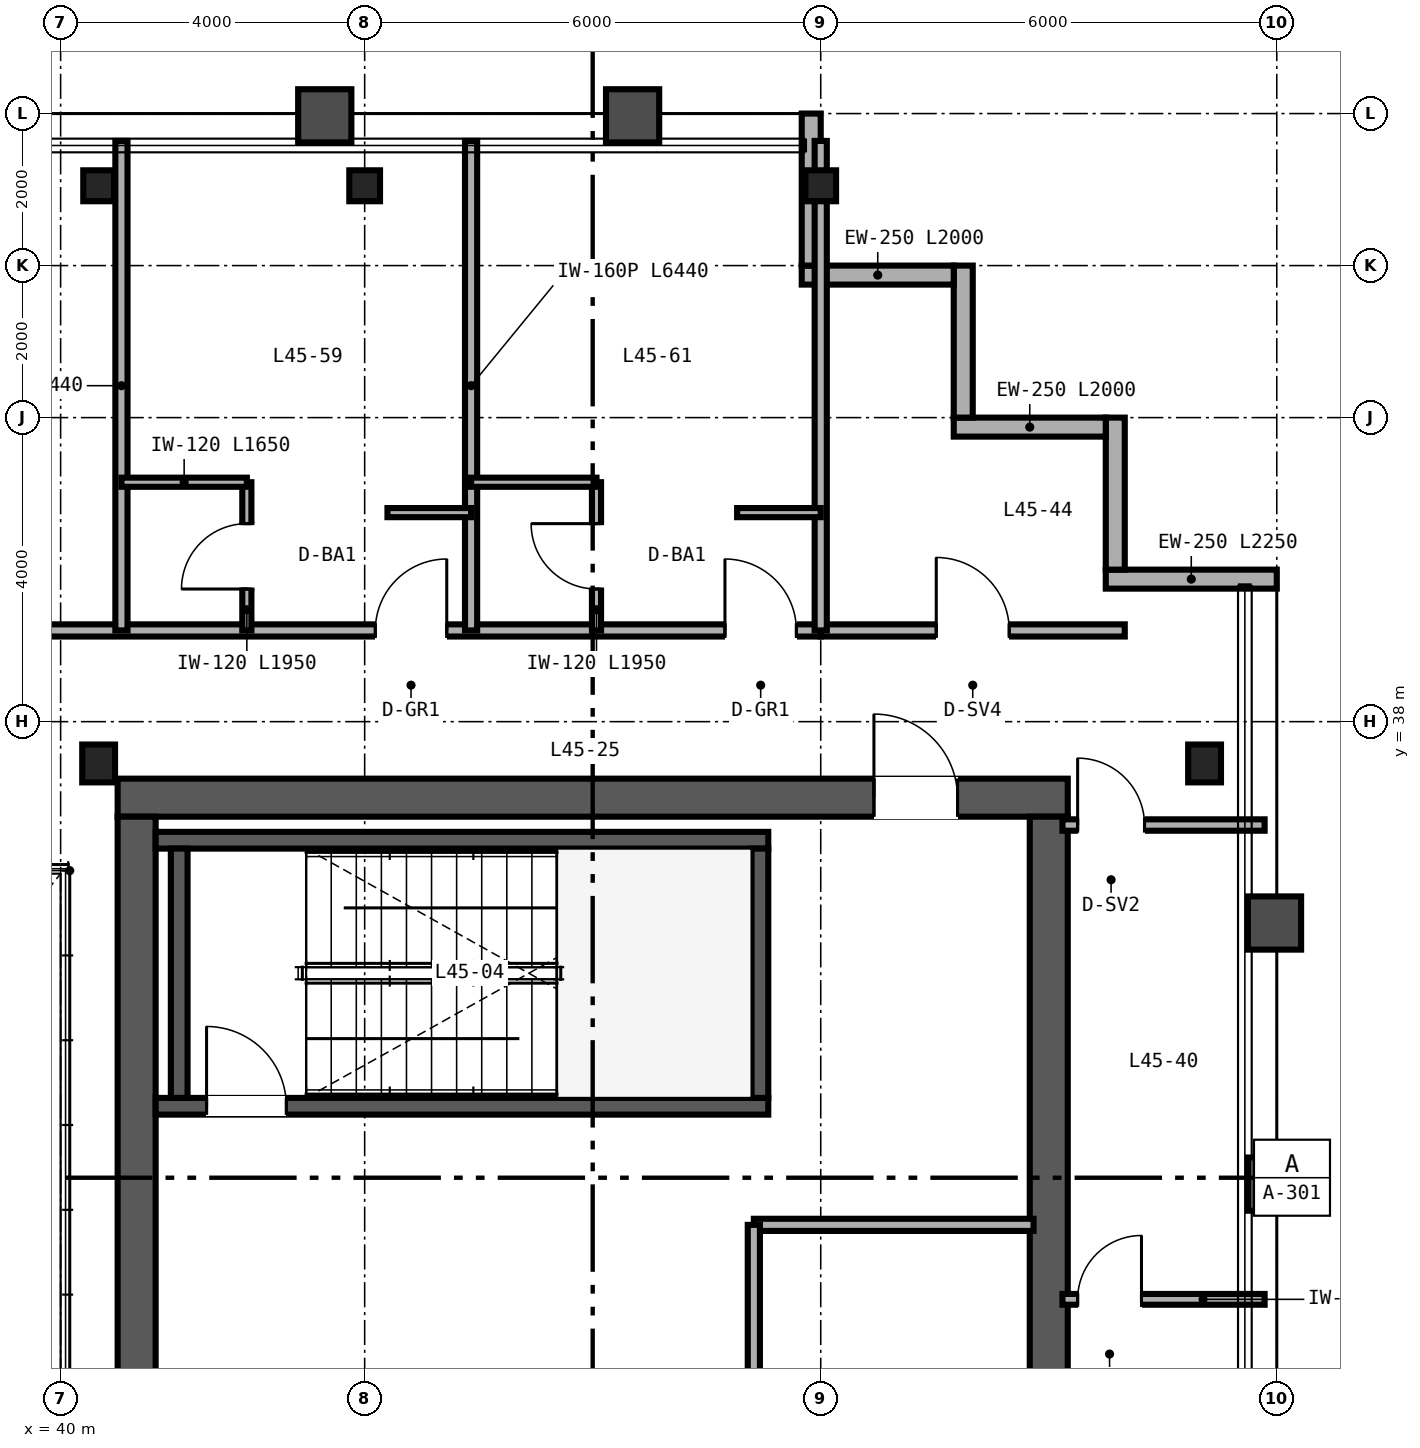
"""IFC4 building model, lengths in metres.
Left out: names, types, materials, properties, quantities, classifications, styles, units other than length and angle.
Written with IfcOpenShell. Run it as: python <this file> out.ifc"""

import sys

from ifc_helpers import new_model, si_unit, direction, frame, frame_2d, origin, origin_2d, place, context, subcontext, project, spatial, rectangle, i_section, extrude, source, transform, mapped, element, fill, save


model = new_model("IFC4")
c1 = context("Model", 3, precision=1e-05, world=origin(), true_north=direction((0.0, 1.0)))
c2 = subcontext(c1, "Body", "Model", "MODEL_VIEW")
j1 = project(units=[si_unit("LENGTHUNIT", "METRE"), si_unit("PLANEANGLEUNIT", "RADIAN")], contexts=[c1])
p1 = place(None, origin())
s1 = spatial("IfcSite", under=j1, at=p1, CompositionType="ELEMENT")
p2 = place(p1, origin())
s2 = spatial("IfcBuilding", under=s1, at=p2, CompositionType="ELEMENT")
p3 = place(p2, frame((0.0, 0.0, 181.2)))
s3 = spatial("IfcBuildingStorey", under=s2, at=p3, CompositionType="ELEMENT", Elevation=181.2)
p4 = place(p3, frame((40.75, 37.0, 0.0), z_axis=(0.0, 0.0, 1.0), x_axis=(1.0, 0.0, 0.0)))
e1 = element("IfcWall", 1, at=p4, inside=s3, PredefinedType="SHEAR", context=c2, shape_type="SweptSolid", body=[
    extrude(rectangle(XDim=12.5, YDim=0.5, at=frame_2d((6.25, 0.0))), origin(), (0.0, 0.0, 1.0), 3.37),
])
p5 = place(p4, frame((9.95, 0.0, 0.0)))
e2 = element("IfcOpeningElement", 2, at=p5, cuts=e1, PredefinedType="OPENING", context=c2, shape_type="SweptSolid", body=[
    extrude(rectangle(XDim=1.1, YDim=2.15, at=frame_2d((0.55, 1.075))), frame((0.0, 0.26, 0.0), z_axis=(0.0, -1.0, 0.0), x_axis=(1.0, 0.0, 0.0)), (0.0, 0.0, 1.0), 0.52),
])
for number, where, z_axis, x_axis in (
    (3, (41.0, 15.25, 0.0), (0.0, 0.0, 1.0), (0.0, 1.0, 0.0)),
    (4, (53.0, 15.25, 0.0), (0.0, 0.0, 1.0), (0.0, 1.0, 0.0)),
):
    element("IfcWall", number, at=place(p3, frame(where, z_axis=z_axis, x_axis=x_axis)), inside=s3, PredefinedType="SHEAR", context=c2, shape_type="SweptSolid", body=[
        extrude(rectangle(XDim=21.5, YDim=0.5, at=frame_2d((10.75, 0.0))), origin(), (0.0, 0.0, 1.0), 3.37),
    ])
p6 = place(p3, frame((41.25, 32.94, 0.0), z_axis=(0.0, 0.0, 1.0), x_axis=(1.0, 0.0, 0.0)))
e5 = element("IfcWall", 5, at=p6, inside=s3, PredefinedType="SHEAR", context=c2, shape_type="SweptSolid", body=[
    extrude(rectangle(XDim=8.06, YDim=0.22, at=frame_2d((4.03, 0.0))), origin(), (0.0, 0.0, 1.0), 3.4),
])
p7 = place(p6, frame((0.67, 0.0, 0.0)))
e6 = element("IfcOpeningElement", 6, at=p7, cuts=e5, PredefinedType="OPENING", context=c2, shape_type="SweptSolid", body=[
    extrude(rectangle(XDim=1.05, YDim=2.15, at=frame_2d((0.525, 1.075))), frame((0.0, 0.12, 0.0), z_axis=(0.0, -1.0, 0.0), x_axis=(1.0, 0.0, 0.0)), (0.0, 0.0, 1.0), 0.24),
])
p8 = place(p3, frame((41.25, 36.44, 0.0), z_axis=(0.0, 0.0, 1.0), x_axis=(1.0, 0.0, 0.0)))
e7 = element("IfcWall", 7, at=p8, inside=s3, PredefinedType="SHEAR", context=c2, shape_type="SweptSolid", body=[
    extrude(rectangle(XDim=8.06, YDim=0.22, at=frame_2d((4.03, 0.0))), origin(), (0.0, 0.0, 1.0), 3.4),
])
for number, where, z_axis, x_axis in (
    (8, (41.56, 33.05, 0.0), (0.0, 0.0, 1.0), (0.0, 1.0, 0.0)),
    (9, (49.2, 33.05, 0.0), (0.0, 0.0, 1.0), (0.0, 1.0, 0.0)),
):
    element("IfcWall", number, at=place(p3, frame(where, z_axis=z_axis, x_axis=x_axis)), inside=s3, PredefinedType="SHEAR", context=c2, shape_type="SweptSolid", body=[
        extrude(rectangle(XDim=3.28, YDim=0.22, at=frame_2d((1.64, 0.0))), origin(), (0.0, 0.0, 1.0), 3.4),
    ])
m1 = source(origin(), c2, "Body", "SweptSolid", [
    extrude(i_section(OverallWidth=0.432, OverallDepth=0.498, WebThickness=0.056, FlangeThickness=0.089, FilletRadius=0.025, at=origin_2d()), origin(), (0.0, 0.0, 1.0), 3.37),
])
for number, where, z_axis, x_axis in (
    (10, (40.5, 37.45, 0.0), (0.0, 0.0, 1.0), (1.0, 0.0, 0.0)),
    (11, (55.05, 37.45, 0.0), (0.0, 0.0, 1.0), (1.0, 0.0, 0.0)),
):
    element("IfcColumn", number, at=place(p3, frame(where, z_axis=z_axis, x_axis=x_axis)), inside=s3, PredefinedType="COLUMN", context=c2, shape_type="MappedRepresentation", body=[
        mapped(m1, transform((0.0, 0.0, 0.0), scale=1.0)),
    ])
m2 = source(origin(), c2, "Body", "SweptSolid", [
    extrude(i_section(OverallWidth=0.404, OverallDepth=0.407, WebThickness=0.027, FlangeThickness=0.044, FilletRadius=0.025, at=origin_2d()), origin(), (0.0, 0.0, 1.0), 3.37),
])
for number, where, z_axis, x_axis in (
    (12, (40.5, 45.05, 0.0), (0.0, 0.0, 1.0), (1.0, 0.0, 0.0)),
    (13, (44.0, 45.05, 0.0), (0.0, 0.0, 1.0), (1.0, 0.0, 0.0)),
    (14, (50.0, 45.05, 0.0), (0.0, 0.0, 1.0), (1.0, 0.0, 0.0)),
):
    element("IfcColumn", number, at=place(p3, frame(where, z_axis=z_axis, x_axis=x_axis)), inside=s3, PredefinedType="COLUMN", context=c2, shape_type="MappedRepresentation", body=[
        mapped(m2, transform((0.0, 0.0, 0.0), scale=1.0)),
    ])
p9 = place(p3, frame((56.0, 39.875, 0.0), z_axis=(0.0, 0.0, 1.0), x_axis=(-1.0, 0.0, 0.0)))
e15 = element("IfcWall", 15, at=p9, inside=s3, PredefinedType="SOLIDWALL", context=c2, shape_type="SweptSolid", body=[
    extrude(rectangle(XDim=2.25, YDim=0.25, at=frame_2d((1.125, 0.0))), origin(), (0.0, 0.0, 1.0), 3.37),
])
for number, where, z_axis, x_axis in (
    (16, (53.875, 40.0, 0.0), (0.0, 0.0, 1.0), (0.0, 1.0, 0.0)),
    (17, (53.75, 41.875, 0.0), (0.0, 0.0, 1.0), (-1.0, 0.0, 0.0)),
    (18, (51.875, 42.0, 0.0), (0.0, 0.0, 1.0), (0.0, 1.0, 0.0)),
    (19, (51.75, 43.875, 0.0), (0.0, 0.0, 1.0), (-1.0, 0.0, 0.0)),
):
    element("IfcWall", number, at=place(p3, frame(where, z_axis=z_axis, x_axis=x_axis)), inside=s3, PredefinedType="SOLIDWALL", context=c2, shape_type="SweptSolid", body=[
        extrude(rectangle(XDim=2.0, YDim=0.25, at=frame_2d((1.0, 0.0))), origin(), (0.0, 0.0, 1.0), 3.37),
    ])
p10 = place(p3, frame((49.875, 44.0, 0.0), z_axis=(0.0, 0.0, 1.0), x_axis=(0.0, 1.0, 0.0)))
e20 = element("IfcWall", 20, at=p10, inside=s3, PredefinedType="SOLIDWALL", context=c2, shape_type="SweptSolid", body=[
    extrude(rectangle(XDim=2.0, YDim=0.25, at=frame_2d((1.0, 0.0))), origin(), (0.0, 0.0, 1.0), 2.677),
])
p11 = place(p3, frame((49.12, 31.38, 0.0), z_axis=(0.0, 0.0, 1.0), x_axis=(1.0, 0.0, 0.0)))
e21 = element("IfcWall", 21, at=p11, inside=s3, PredefinedType="PARTITIONING", context=c2, shape_type="SweptSolid", body=[
    extrude(rectangle(XDim=3.68, YDim=0.16, at=frame_2d((1.84, 0.0))), origin(), (0.0, 0.0, 1.0), 2.47),
])
p12 = place(p3, frame((49.12, 15.25, 0.0), z_axis=(0.0, 0.0, 1.0), x_axis=(0.0, 1.0, 0.0)))
e22 = element("IfcWall", 22, at=p12, inside=s3, PredefinedType="PARTITIONING", context=c2, shape_type="SweptSolid", body=[
    extrude(rectangle(XDim=16.13, YDim=0.16, at=frame_2d((8.065, 0.0))), origin(), (0.0, 0.0, 1.0), 2.443),
])
p13 = place(p12, frame((4.0, 0.0, 0.0)))
e23 = element("IfcOpeningElement", 23, at=p13, cuts=e22, PredefinedType="OPENING", context=c2, shape_type="SweptSolid", body=[
    extrude(rectangle(XDim=0.92, YDim=2.15, at=frame_2d((0.46, 1.075))), frame((0.0, 0.09, 0.0), z_axis=(0.0, -1.0, 0.0), x_axis=(1.0, 0.0, 0.0)), (0.0, 0.0, 1.0), 0.18),
])
p14 = place(p12, frame((12.0, 0.0, 0.0)))
e24 = element("IfcOpeningElement", 24, at=p14, cuts=e22, PredefinedType="OPENING", context=c2, shape_type="SweptSolid", body=[
    extrude(rectangle(XDim=0.92, YDim=2.15, at=frame_2d((0.46, 1.075))), frame((0.0, 0.09, 0.0), z_axis=(0.0, -1.0, 0.0), x_axis=(1.0, 0.0, 0.0)), (0.0, 0.0, 1.0), 0.18),
])
p15 = place(p3, frame((53.18, 36.64, 0.0), z_axis=(0.0, 0.0, 1.0), x_axis=(1.0, 0.0, 0.0)))
e25 = element("IfcWall", 25, at=p15, inside=s3, PredefinedType="PARTITIONING", context=c2, shape_type="SweptSolid", body=[
    extrude(rectangle(XDim=2.66, YDim=0.15, at=frame_2d((1.33, 0.0))), origin(), (0.0, 0.0, 1.0), 2.753),
])
p16 = place(p15, frame((0.2, 0.0, 0.0)))
e26 = element("IfcOpeningElement", 26, at=p16, cuts=e25, PredefinedType="OPENING", context=c2, shape_type="SweptSolid", body=[
    extrude(rectangle(XDim=0.88, YDim=2.15, at=frame_2d((0.44, 1.075))), frame((0.0, 0.085, 0.0), z_axis=(0.0, -1.0, 0.0), x_axis=(1.0, 0.0, 0.0)), (0.0, 0.0, 1.0), 0.17),
])
p17 = place(p3, frame((53.18, 30.4, 0.0), z_axis=(0.0, 0.0, 1.0), x_axis=(1.0, 0.0, 0.0)))
e27 = element("IfcWall", 27, at=p17, inside=s3, PredefinedType="PARTITIONING", context=c2, shape_type="SweptSolid", body=[
    extrude(rectangle(XDim=2.66, YDim=0.142, at=frame_2d((1.33, 0.0))), origin(), (0.0, 0.0, 1.0), 2.753),
])
p18 = place(p17, frame((0.2, 0.0, 0.0)))
e28 = element("IfcOpeningElement", 28, at=p18, cuts=e27, PredefinedType="OPENING", context=c2, shape_type="SweptSolid", body=[
    extrude(rectangle(XDim=0.84, YDim=2.1, at=frame_2d((0.42, 1.05))), frame((0.0, 0.081, 0.0), z_axis=(0.0, -1.0, 0.0), x_axis=(1.0, 0.0, 0.0)), (0.0, 0.0, 1.0), 0.162),
])
p19 = place(p3, frame((50.0, 39.2, 0.0), z_axis=(0.0, 0.0, 1.0), x_axis=(1.0, 0.0, 0.0)))
e29 = element("IfcWall", 29, at=p19, inside=s3, PredefinedType="PARTITIONING", context=c2, shape_type="SweptSolid", body=[
    extrude(rectangle(XDim=4.0, YDim=0.16, at=frame_2d((2.0, 0.0))), origin(), (0.0, 0.0, 1.0), 3.37),
])
p20 = place(p19, frame((1.52, 0.0, 0.0)))
e30 = element("IfcOpeningElement", 30, at=p20, cuts=e29, PredefinedType="OPENING", context=c2, shape_type="SweptSolid", body=[
    extrude(rectangle(XDim=0.96, YDim=2.15, at=frame_2d((0.48, 1.075))), frame((0.0, 0.09, 0.0), z_axis=(0.0, -1.0, 0.0), x_axis=(1.0, 0.0, 0.0)), (0.0, 0.0, 1.0), 0.18),
])
p21 = place(p3, frame((14.0, 39.2, 0.0), z_axis=(0.0, 0.0, 1.0), x_axis=(1.0, 0.0, 0.0)))
e31 = element("IfcWall", 31, at=p21, inside=s3, PredefinedType="PARTITIONING", context=c2, shape_type="SweptSolid", body=[
    extrude(rectangle(XDim=36.0, YDim=0.16, at=frame_2d((18.0, 0.0))), origin(), (0.0, 0.0, 1.0), 2.913),
])
p22 = place(p21, frame((7.5, 0.0, 0.0)))
e32 = element("IfcOpeningElement", 32, at=p22, cuts=e31, PredefinedType="OPENING", context=c2, shape_type="SweptSolid", body=[
    extrude(rectangle(XDim=0.98, YDim=2.2, at=frame_2d((0.49, 1.1))), frame((0.0, 0.09, 0.0), z_axis=(0.0, -1.0, 0.0), x_axis=(1.0, 0.0, 0.0)), (0.0, 0.0, 1.0), 0.18),
])
p23 = place(p21, frame((16.5, 0.0, 0.0)))
e33 = element("IfcOpeningElement", 33, at=p23, cuts=e31, PredefinedType="OPENING", context=c2, shape_type="SweptSolid", body=[
    extrude(rectangle(XDim=0.98, YDim=2.2, at=frame_2d((0.49, 1.1))), frame((0.0, 0.09, 0.0), z_axis=(0.0, -1.0, 0.0), x_axis=(1.0, 0.0, 0.0)), (0.0, 0.0, 1.0), 0.18),
])
p24 = place(p21, frame((21.82, 0.0, 0.0)))
e34 = element("IfcOpeningElement", 34, at=p24, cuts=e31, PredefinedType="OPENING", context=c2, shape_type="SweptSolid", body=[
    extrude(rectangle(XDim=0.96, YDim=2.15, at=frame_2d((0.48, 1.075))), frame((0.0, 0.09, 0.0), z_axis=(0.0, -1.0, 0.0), x_axis=(1.0, 0.0, 0.0)), (0.0, 0.0, 1.0), 0.18),
])
p25 = place(p21, frame((30.14, 0.0, 0.0)))
e35 = element("IfcOpeningElement", 35, at=p25, cuts=e31, PredefinedType="OPENING", context=c2, shape_type="SweptSolid", body=[
    extrude(rectangle(XDim=0.94, YDim=2.15, at=frame_2d((0.47, 1.075))), frame((0.0, 0.09, 0.0), z_axis=(0.0, -1.0, 0.0), x_axis=(1.0, 0.0, 0.0)), (0.0, 0.0, 1.0), 0.18),
])
p26 = place(p21, frame((34.74, 0.0, 0.0)))
e36 = element("IfcOpeningElement", 36, at=p26, cuts=e31, PredefinedType="OPENING", context=c2, shape_type="SweptSolid", body=[
    extrude(rectangle(XDim=0.94, YDim=2.15, at=frame_2d((0.47, 1.075))), frame((0.0, 0.09, 0.0), z_axis=(0.0, -1.0, 0.0), x_axis=(1.0, 0.0, 0.0)), (0.0, 0.0, 1.0), 0.18),
])
p27 = place(p3, frame((50.0, 39.2, 0.0), z_axis=(0.0, 0.0, 1.0), x_axis=(0.0, 1.0, 0.0)))
e37 = element("IfcWall", 37, at=p27, inside=s3, PredefinedType="PARTITIONING", context=c2, shape_type="SweptSolid", body=[
    extrude(rectangle(XDim=6.44, YDim=0.16, at=frame_2d((3.22, 0.0))), origin(), (0.0, 0.0, 1.0), 2.677),
])
p28 = place(p3, frame((40.8, 39.2, 0.0), z_axis=(0.0, 0.0, 1.0), x_axis=(0.0, 1.0, 0.0)))
e38 = element("IfcWall", 38, at=p28, inside=s3, PredefinedType="PARTITIONING", context=c2, shape_type="SweptSolid", body=[
    extrude(rectangle(XDim=6.44, YDim=0.16, at=frame_2d((3.22, 0.0))), origin(), (0.0, 0.0, 1.0), 2.443),
])
p29 = place(p3, frame((45.4, 39.2, 0.0), z_axis=(0.0, 0.0, 1.0), x_axis=(0.0, 1.0, 0.0)))
e39 = element("IfcWall", 39, at=p29, inside=s3, PredefinedType="PARTITIONING", context=c2, shape_type="SweptSolid", body=[
    extrude(rectangle(XDim=6.44, YDim=0.16, at=frame_2d((3.22, 0.0))), origin(), (0.0, 0.0, 1.0), 2.677),
])
p30 = place(p3, frame((42.45, 39.2, 0.0), z_axis=(0.0, 0.0, 1.0), x_axis=(0.0, 1.0, 0.0)))
e40 = element("IfcWall", 40, at=p30, inside=s3, PredefinedType="PARTITIONING", context=c2, shape_type="SweptSolid", body=[
    extrude(rectangle(XDim=1.95, YDim=0.12, at=frame_2d((0.975, 0.0))), origin(), (0.0, 0.0, 1.0), 3.37),
])
p31 = place(p30, frame((0.545, 0.0, 0.0)))
e41 = element("IfcOpeningElement", 41, at=p31, cuts=e40, PredefinedType="OPENING", context=c2, shape_type="SweptSolid", body=[
    extrude(rectangle(XDim=0.86, YDim=2.1, at=frame_2d((0.43, 1.05))), frame((0.0, 0.07, 0.0), z_axis=(0.0, -1.0, 0.0), x_axis=(1.0, 0.0, 0.0)), (0.0, 0.0, 1.0), 0.14),
])
p32 = place(p3, frame((40.8, 41.15, 0.0), z_axis=(0.0, 0.0, 1.0), x_axis=(1.0, 0.0, 0.0)))
e42 = element("IfcWall", 42, at=p32, inside=s3, PredefinedType="PARTITIONING", context=c2, shape_type="SweptSolid", body=[
    extrude(rectangle(XDim=1.65, YDim=0.12, at=frame_2d((0.825, 0.0))), origin(), (0.0, 0.0, 1.0), 3.37),
])
p33 = place(p3, frame((44.3, 40.75, 0.0), z_axis=(0.0, 0.0, 1.0), x_axis=(1.0, 0.0, 0.0)))
e43 = element("IfcWall", 43, at=p33, inside=s3, PredefinedType="PARTITIONING", context=c2, shape_type="SweptSolid", body=[
    extrude(rectangle(XDim=1.1, YDim=0.12, at=frame_2d((0.55, 0.0))), origin(), (0.0, 0.0, 1.0), 3.37),
])
p34 = place(p3, frame((47.05, 39.2, 0.0), z_axis=(0.0, 0.0, 1.0), x_axis=(0.0, 1.0, 0.0)))
e44 = element("IfcWall", 44, at=p34, inside=s3, PredefinedType="PARTITIONING", context=c2, shape_type="SweptSolid", body=[
    extrude(rectangle(XDim=1.95, YDim=0.12, at=frame_2d((0.975, 0.0))), origin(), (0.0, 0.0, 1.0), 3.37),
])
p35 = place(p34, frame((0.545, 0.0, 0.0)))
e45 = element("IfcOpeningElement", 45, at=p35, cuts=e44, PredefinedType="OPENING", context=c2, shape_type="SweptSolid", body=[
    extrude(rectangle(XDim=0.86, YDim=2.1, at=frame_2d((0.43, 1.05))), frame((0.0, 0.07, 0.0), z_axis=(0.0, -1.0, 0.0), x_axis=(1.0, 0.0, 0.0)), (0.0, 0.0, 1.0), 0.14),
])
p36 = place(p3, frame((45.4, 41.15, 0.0), z_axis=(0.0, 0.0, 1.0), x_axis=(1.0, 0.0, 0.0)))
e46 = element("IfcWall", 46, at=p36, inside=s3, PredefinedType="PARTITIONING", context=c2, shape_type="SweptSolid", body=[
    extrude(rectangle(XDim=1.65, YDim=0.12, at=frame_2d((0.825, 0.0))), origin(), (0.0, 0.0, 1.0), 3.37),
])
p37 = place(p3, frame((48.9, 40.75, 0.0), z_axis=(0.0, 0.0, 1.0), x_axis=(1.0, 0.0, 0.0)))
e47 = element("IfcWall", 47, at=p37, inside=s3, PredefinedType="PARTITIONING", context=c2, shape_type="SweptSolid", body=[
    extrude(rectangle(XDim=1.1, YDim=0.12, at=frame_2d((0.55, 0.0))), origin(), (0.0, 0.0, 1.0), 3.37),
])
m3 = source(origin(), c2, "Body", "SweptSolid", [
    extrude(rectangle(XDim=1.05, YDim=2.15, at=frame_2d((0.525, 1.075))), frame((0.0, 0.025, 0.0), z_axis=(0.0, -1.0, 0.0), x_axis=(1.0, 0.0, 0.0)), (0.0, 0.0, 1.0), 0.05),
])
p38 = place(p7, origin())
e48 = element("IfcDoor", 48, at=p38, inside=s3, OperationType="SINGLE_SWING_LEFT", PredefinedType="DOOR", context=c2, shape_type="MappedRepresentation", body=[
    mapped(m3, transform((0.0, 0.0, 0.0), scale=1.0)),
])
fill(e6, e48)
m4 = source(origin(), c2, "Body", "SweptSolid", [
    extrude(rectangle(XDim=1.1, YDim=2.15, at=frame_2d((0.55, 1.075))), frame((0.0, 0.025, 0.0), z_axis=(0.0, -1.0, 0.0), x_axis=(1.0, 0.0, 0.0)), (0.0, 0.0, 1.0), 0.05),
])
p39 = place(p5, origin())
e49 = element("IfcDoor", 49, at=p39, inside=s3, OperationType="SINGLE_SWING_LEFT", PredefinedType="DOOR", context=c2, shape_type="MappedRepresentation", body=[
    mapped(m4, transform((0.0, 0.0, 0.0), scale=1.0)),
])
fill(e2, e49)
m5 = source(origin(), c2, "Body", "SweptSolid", [
    extrude(rectangle(XDim=0.88, YDim=2.15, at=frame_2d((0.44, 1.075))), frame((0.0, 0.025, 0.0), z_axis=(0.0, -1.0, 0.0), x_axis=(1.0, 0.0, 0.0)), (0.0, 0.0, 1.0), 0.05),
])
p40 = place(p16, origin())
e50 = element("IfcDoor", 50, at=p40, inside=s3, OperationType="SINGLE_SWING_LEFT", PredefinedType="DOOR", context=c2, shape_type="MappedRepresentation", body=[
    mapped(m5, transform((0.0, 0.0, 0.0), scale=1.0)),
])
fill(e26, e50)
m6 = source(origin(), c2, "Body", "SweptSolid", [
    extrude(rectangle(XDim=0.84, YDim=2.1, at=frame_2d((0.42, 1.05))), frame((0.0, 0.025, 0.0), z_axis=(0.0, -1.0, 0.0), x_axis=(1.0, 0.0, 0.0)), (0.0, 0.0, 1.0), 0.05),
])
p41 = place(p18, origin())
e51 = element("IfcDoor", 51, at=p41, inside=s3, OperationType="SINGLE_SWING_RIGHT", PredefinedType="DOOR", context=c2, shape_type="MappedRepresentation", body=[
    mapped(m6, transform((0.0, 0.0, 0.0), scale=1.0)),
])
fill(e28, e51)
m7 = source(origin(), c2, "Body", "SweptSolid", [
    extrude(rectangle(XDim=0.96, YDim=2.15, at=frame_2d((0.48, 1.075))), frame((0.0, 0.025, 0.0), z_axis=(0.0, -1.0, 0.0), x_axis=(1.0, 0.0, 0.0)), (0.0, 0.0, 1.0), 0.05),
])
p42 = place(p20, origin())
e52 = element("IfcDoor", 52, at=p42, inside=s3, OperationType="SINGLE_SWING_LEFT", PredefinedType="DOOR", context=c2, shape_type="MappedRepresentation", body=[
    mapped(m7, transform((0.0, 0.0, 0.0), scale=1.0)),
])
fill(e30, e52)
m8 = source(origin(), c2, "Body", "SweptSolid", [
    extrude(rectangle(XDim=0.86, YDim=2.1, at=frame_2d((0.43, 1.05))), frame((0.0, 0.025, 0.0), z_axis=(0.0, -1.0, 0.0), x_axis=(1.0, 0.0, 0.0)), (0.0, 0.0, 1.0), 0.05),
])
p43 = place(p31, origin())
e53 = element("IfcDoor", 53, at=p43, inside=s3, OperationType="SINGLE_SWING_LEFT", PredefinedType="DOOR", context=c2, shape_type="MappedRepresentation", body=[
    mapped(m8, transform((0.0, 0.0, 0.0), scale=1.0)),
])
fill(e41, e53)
p44 = place(p35, origin())
e54 = element("IfcDoor", 54, at=p44, inside=s3, OperationType="SINGLE_SWING_RIGHT", PredefinedType="DOOR", context=c2, shape_type="MappedRepresentation", body=[
    mapped(m8, transform((0.0, 0.0, 0.0), scale=1.0)),
])
fill(e45, e54)
m9 = source(origin(), c2, "Body", "SweptSolid", [
    extrude(rectangle(XDim=0.94, YDim=2.15, at=frame_2d((0.47, 1.075))), frame((0.0, 0.025, 0.0), z_axis=(0.0, -1.0, 0.0), x_axis=(1.0, 0.0, 0.0)), (0.0, 0.0, 1.0), 0.05),
])
p45 = place(p25, origin())
e55 = element("IfcDoor", 55, at=p45, inside=s3, OperationType="SINGLE_SWING_RIGHT", PredefinedType="DOOR", context=c2, shape_type="MappedRepresentation", body=[
    mapped(m9, transform((0.0, 0.0, 0.0), scale=1.0)),
])
fill(e35, e55)
p46 = place(p26, origin())
e56 = element("IfcDoor", 56, at=p46, inside=s3, OperationType="SINGLE_SWING_LEFT", PredefinedType="DOOR", context=c2, shape_type="MappedRepresentation", body=[
    mapped(m9, transform((0.0, 0.0, 0.0), scale=1.0)),
])
fill(e36, e56)
save(model, sys.argv[1])
